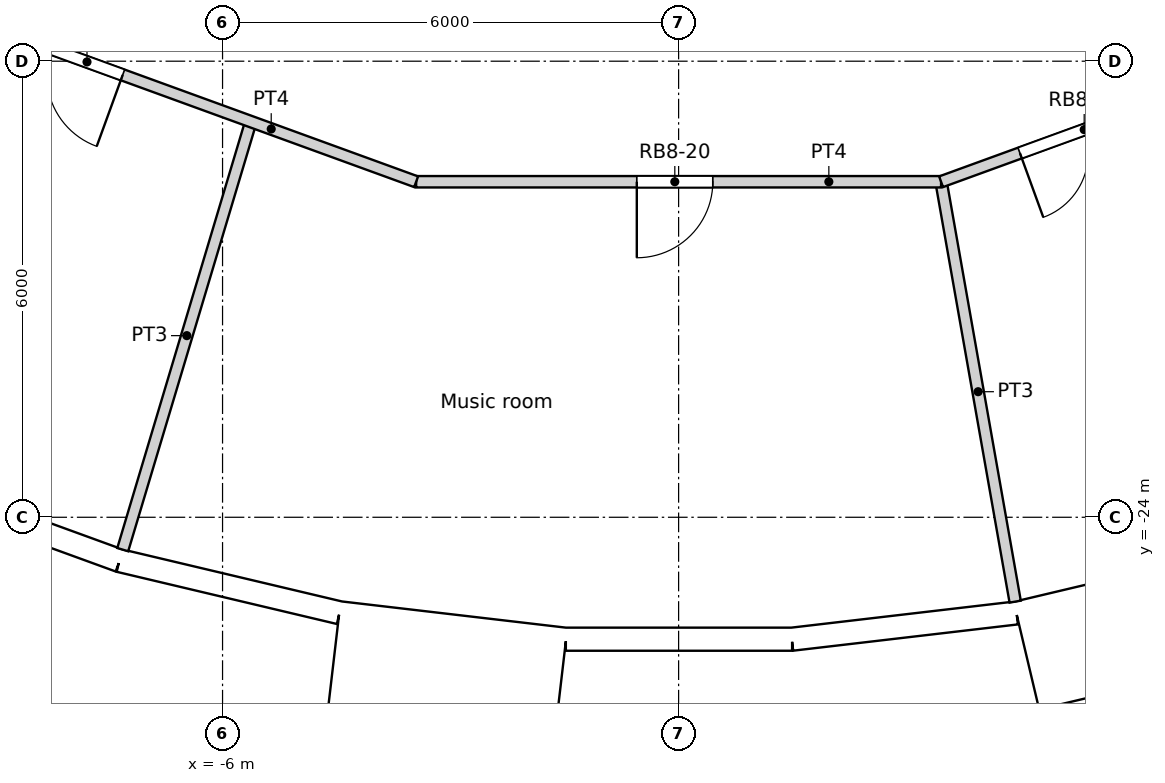
"""IFC4 building model, lengths in metres.
Left out: names, types, materials, properties, quantities, classifications, styles, units other than length and angle.
Written with IfcOpenShell. Run it as: python <this file> out.ifc"""

import sys

from ifc_helpers import new_model, si_unit, direction, frame, frame_2d, origin, origin_2d, place, context, subcontext, project, spatial, rectangle, circle, extrude, element, fill, save


model = new_model("IFC4")
c1 = context("Model", 3, precision=1e-05, world=origin(), true_north=direction((0.0, 1.0)))
c2 = subcontext(c1, "Body", "Model", "MODEL_VIEW")
j1 = project(units=[si_unit("LENGTHUNIT", "METRE"), si_unit("PLANEANGLEUNIT", "RADIAN")], contexts=[c1])
p1 = place(None, origin())
s1 = spatial("IfcSite", under=j1, at=p1, CompositionType="ELEMENT")
p2 = place(p1, origin())
s2 = spatial("IfcBuilding", under=s1, at=p2, CompositionType="ELEMENT")
p3 = place(p2, frame((0.0, 0.0, 201.6)))
s3 = spatial("IfcBuildingStorey", under=s2, at=p3, CompositionType="ELEMENT", Elevation=201.6)
for number, where, z_axis, x_axis in (
    (1, (-7.04, -23.516, 0.0), (0.0, 0.0, 1.0), (1.0, 0.0, 0.0)),
    (2, (-1.427, -24.506, 0.0), (0.0, 0.0, 1.0), (1.0, 0.0, 0.0)),
    (3, (4.263, -24.175, 0.0), (0.0, 0.0, 1.0), (1.0, 0.0, 0.0)),
):
    element("IfcColumn", number, at=place(p3, frame(where, z_axis=z_axis, x_axis=x_axis)), inside=s3, PredefinedType="COLUMN", context=c2, shape_type="SweptSolid", body=[
        extrude(circle(Radius=0.6, at=origin_2d()), origin(), (0.0, 0.0, 1.0), 3.6),
    ])
for number, where, z_axis, x_axis in (
    (4, (-4.188, -18.35, 0.0), (0.0, 0.0, 1.0), (1.0, 0.0, 0.0)),
    (5, (1.406, -18.77, 0.0), (0.0, 0.0, 1.0), (1.0, 0.0, 0.0)),
):
    element("IfcColumn", number, at=place(p3, frame(where, z_axis=z_axis, x_axis=x_axis)), inside=s3, PredefinedType="COLUMN", context=c2, shape_type="SweptSolid", body=[
        extrude(circle(Radius=0.65, at=origin_2d()), origin(), (0.0, 0.0, 1.0), 3.6),
    ])
p4 = place(p3, frame((-10.149, -23.553, 0.0), z_axis=(0.0, 0.0, 1.0), x_axis=(0.939690282133, -0.342026568652, 0.0)))
e6 = element("IfcWall", 6, at=p4, inside=s3, PredefinedType="SOLIDWALL", context=c2, shape_type="SweptSolid", body=[
    extrude(rectangle(XDim=2.973, YDim=0.3, at=frame_2d((1.486, 0.0))), origin(), (0.0, 0.0, 1.0), 3.3),
])
p5 = place(p4, frame((1.486, 0.0, 1.55)))
e7 = element("IfcOpeningElement", 7, at=p5, cuts=e6, PredefinedType="OPENING", context=c2, shape_type="SweptSolid", body=[
    extrude(circle(Radius=0.9, at=origin_2d()), frame((0.0, 0.16, 0.0), z_axis=(0.0, -1.0, 0.0), x_axis=(1.0, 0.0, 0.0)), (0.0, 0.0, 1.0), 0.32),
])
p6 = place(p3, frame((-7.356, -24.57, 0.0), z_axis=(0.0, 0.0, 1.0), x_axis=(0.973045378923, -0.230613725862, 0.0)))
e8 = element("IfcWall", 8, at=p6, inside=s3, PredefinedType="SOLIDWALL", context=c2, shape_type="SweptSolid", body=[
    extrude(rectangle(XDim=2.973, YDim=0.3, at=frame_2d((1.486, 0.0))), origin(), (0.0, 0.0, 1.0), 3.3),
])
p7 = place(p6, frame((1.486, 0.0, 1.55)))
e9 = element("IfcOpeningElement", 9, at=p7, cuts=e8, PredefinedType="OPENING", context=c2, shape_type="SweptSolid", body=[
    extrude(circle(Radius=0.9, at=origin_2d()), frame((0.0, 0.16, 0.0), z_axis=(0.0, -1.0, 0.0), x_axis=(1.0, 0.0, 0.0)), (0.0, 0.0, 1.0), 0.32),
])
p8 = place(p3, frame((-4.529, -25.828, -0.3), z_axis=(0.0, 0.0, 1.0), x_axis=(0.9932342274, -0.116128246006, 0.0)))
e10 = element("IfcWall", 10, at=p8, inside=s3, PredefinedType="ELEMENTEDWALL", context=c2, shape_type="SweptSolid", body=[
    extrude(rectangle(XDim=3.0, YDim=1.45, at=frame_2d((1.5, 0.0))), origin(), (0.0, 0.0, 1.0), 3.6),
])
p9 = place(p8, frame((1.5, 0.0, 1.85)))
e11 = element("IfcOpeningElement", 11, at=p9, cuts=e10, PredefinedType="OPENING", context=c2, shape_type="SweptSolid", body=[
    extrude(circle(Radius=0.9, at=origin_2d()), frame((0.0, 0.735, 0.0), z_axis=(0.0, -1.0, 0.0), x_axis=(1.0, 0.0, 0.0)), (0.0, 0.0, 1.0), 1.47),
])
p10 = place(p3, frame((-1.482, -25.604, 0.0), z_axis=(0.0, 0.0, 1.0), x_axis=(1.0, 0.0, 0.0)))
e12 = element("IfcWall", 12, at=p10, inside=s3, PredefinedType="SOLIDWALL", context=c2, shape_type="SweptSolid", body=[
    extrude(rectangle(XDim=2.973, YDim=0.3, at=frame_2d((1.486, 0.0))), origin(), (0.0, 0.0, 1.0), 3.3),
])
p11 = place(p10, frame((1.486, 0.0, 1.55)))
e13 = element("IfcOpeningElement", 13, at=p11, cuts=e12, PredefinedType="OPENING", context=c2, shape_type="SweptSolid", body=[
    extrude(circle(Radius=0.9, at=origin_2d()), frame((0.0, 0.16, 0.0), z_axis=(0.0, -1.0, 0.0), x_axis=(1.0, 0.0, 0.0)), (0.0, 0.0, 1.0), 0.32),
])
p12 = place(p3, frame((1.491, -25.604, 0.0), z_axis=(0.0, 0.0, 1.0), x_axis=(0.993245010522, 0.1160359818, 0.0)))
e14 = element("IfcWall", 14, at=p12, inside=s3, PredefinedType="SOLIDWALL", context=c2, shape_type="SweptSolid", body=[
    extrude(rectangle(XDim=2.973, YDim=0.3, at=frame_2d((1.486, 0.0))), origin(), (0.0, 0.0, 1.0), 3.3),
])
p13 = place(p12, frame((1.486, 0.0, 1.55)))
e15 = element("IfcOpeningElement", 15, at=p13, cuts=e14, PredefinedType="OPENING", context=c2, shape_type="SweptSolid", body=[
    extrude(circle(Radius=0.9, at=origin_2d()), frame((0.0, 0.16, 0.0), z_axis=(0.0, -1.0, 0.0), x_axis=(1.0, 0.0, 0.0)), (0.0, 0.0, 1.0), 0.32),
])
p14 = place(p3, frame((4.578, -25.819, -0.3), z_axis=(0.0, 0.0, 1.0), x_axis=(0.973042333261, 0.23062657627, 0.0)))
e16 = element("IfcWall", 16, at=p14, inside=s3, PredefinedType="ELEMENTEDWALL", context=c2, shape_type="SweptSolid", body=[
    extrude(rectangle(XDim=3.0, YDim=1.45, at=frame_2d((1.5, 0.0))), origin(), (0.0, 0.0, 1.0), 3.6),
])
p15 = place(p14, frame((1.5, 0.0, 1.85)))
e17 = element("IfcOpeningElement", 17, at=p15, cuts=e16, PredefinedType="OPENING", context=c2, shape_type="SweptSolid", body=[
    extrude(circle(Radius=0.9, at=origin_2d()), frame((0.0, 0.735, 0.0), z_axis=(0.0, -1.0, 0.0), x_axis=(1.0, 0.0, 0.0)), (0.0, 0.0, 1.0), 1.47),
])
p16 = place(p3, frame((-9.944, -17.223, 0.0), z_axis=(0.0, 0.0, 1.0), x_axis=(0.939672634566, -0.342075050021, 0.0)))
e18 = element("IfcWall", 18, at=p16, inside=s3, PredefinedType="PARTITIONING", context=c2, shape_type="SweptSolid", body=[
    extrude(rectangle(XDim=6.908, YDim=0.15, at=frame_2d((3.454, 0.0))), origin(), (0.0, 0.0, 1.0), 3.3),
])
p17 = place(p16, frame((1.799, 0.0, 0.0)))
e19 = element("IfcOpeningElement", 19, at=p17, cuts=e18, PredefinedType="OPENING", context=c2, shape_type="SweptSolid", body=[
    extrude(rectangle(XDim=1.0, YDim=2.04, at=frame_2d((0.5, 1.02))), frame((0.0, 0.075, 0.0), z_axis=(0.0, -1.0, 0.0), x_axis=(1.0, 0.0, 0.0)), (0.0, 0.0, 1.0), 0.15),
])
p18 = place(p3, frame((-3.453, -19.586, 0.0), z_axis=(0.0, 0.0, 1.0), x_axis=(1.0, 0.0, 0.0)))
e20 = element("IfcWall", 20, at=p18, inside=s3, PredefinedType="PARTITIONING", context=c2, shape_type="SweptSolid", body=[
    extrude(rectangle(XDim=6.906, YDim=0.15, at=frame_2d((3.453, 0.0))), origin(), (0.0, 0.0, 1.0), 3.3),
])
p19 = place(p18, frame((2.903, 0.0, 0.0)))
e21 = element("IfcOpeningElement", 21, at=p19, cuts=e20, PredefinedType="OPENING", context=c2, shape_type="SweptSolid", body=[
    extrude(rectangle(XDim=1.0, YDim=2.04, at=frame_2d((0.5, 1.02))), frame((0.0, 0.075, 0.0), z_axis=(0.0, -1.0, 0.0), x_axis=(1.0, 0.0, 0.0)), (0.0, 0.0, 1.0), 0.15),
])
p20 = place(p3, frame((3.453, -19.586, 0.0), z_axis=(0.0, 0.0, 1.0), x_axis=(0.939672634566, 0.342075050021, 0.0)))
e22 = element("IfcWall", 22, at=p20, inside=s3, PredefinedType="PARTITIONING", context=c2, shape_type="SweptSolid", body=[
    extrude(rectangle(XDim=6.908, YDim=0.15, at=frame_2d((3.454, 0.0))), origin(), (0.0, 0.0, 1.0), 3.3),
])
p21 = place(p20, frame((1.104, 0.0, 0.0)))
e23 = element("IfcOpeningElement", 23, at=p21, cuts=e22, PredefinedType="OPENING", context=c2, shape_type="SweptSolid", body=[
    extrude(rectangle(XDim=1.8, YDim=2.1, at=frame_2d((0.9, 1.05))), frame((0.0, 0.075, 0.0), z_axis=(0.0, -1.0, 0.0), x_axis=(1.0, 0.0, 0.0)), (0.0, 0.0, 1.0), 0.15),
])
p22 = place(p3, frame((-7.313, -24.426, 0.0), z_axis=(0.0, 0.0, 1.0), x_axis=(0.286833432865, 0.957980470464, 0.0)))
e24 = element("IfcWall", 24, at=p22, inside=s3, PredefinedType="PARTITIONING", context=c2, shape_type="SweptSolid", body=[
    extrude(rectangle(XDim=5.878, YDim=0.15, at=frame_2d((2.939, 0.0))), origin(), (0.0, 0.0, 1.0), 3.3),
])
p23 = place(p3, frame((3.453, -19.586, 0.0), z_axis=(0.0, 0.0, 1.0), x_axis=(0.17382754149, -0.984776109489, 0.0)))
e25 = element("IfcWall", 25, at=p23, inside=s3, PredefinedType="PARTITIONING", context=c2, shape_type="SweptSolid", body=[
    extrude(rectangle(XDim=5.61, YDim=0.15, at=frame_2d((2.805, 0.0))), origin(), (0.0, 0.0, 1.0), 3.3),
])
p24 = place(p5, origin())
e26 = element("IfcWindow", 26, at=p24, inside=s3, PartitioningType="SINGLE_PANEL", PredefinedType="WINDOW", context=c2, shape_type="SweptSolid", body=[
    extrude(circle(Radius=0.9, at=origin_2d()), frame((0.0, 0.12, 0.0), z_axis=(0.0, -1.0, 0.0), x_axis=(1.0, 0.0, 0.0)), (0.0, 0.0, 1.0), 0.1),
])
fill(e7, e26)
p25 = place(p7, origin())
e27 = element("IfcWindow", 27, at=p25, inside=s3, PartitioningType="SINGLE_PANEL", PredefinedType="WINDOW", context=c2, shape_type="SweptSolid", body=[
    extrude(circle(Radius=0.9, at=origin_2d()), frame((0.0, 0.12, 0.0), z_axis=(0.0, -1.0, 0.0), x_axis=(1.0, 0.0, 0.0)), (0.0, 0.0, 1.0), 0.1),
])
fill(e9, e27)
p26 = place(p9, origin())
e28 = element("IfcWindow", 28, at=p26, inside=s3, PartitioningType="SINGLE_PANEL", PredefinedType="WINDOW", context=c2, shape_type="SweptSolid", body=[
    extrude(circle(Radius=0.9, at=origin_2d()), frame((0.0, 0.695, 0.0), z_axis=(0.0, -1.0, 0.0), x_axis=(1.0, 0.0, 0.0)), (0.0, 0.0, 1.0), 0.1),
])
fill(e11, e28)
p27 = place(p11, origin())
e29 = element("IfcWindow", 29, at=p27, inside=s3, PartitioningType="SINGLE_PANEL", PredefinedType="WINDOW", context=c2, shape_type="SweptSolid", body=[
    extrude(circle(Radius=0.9, at=origin_2d()), frame((0.0, 0.12, 0.0), z_axis=(0.0, -1.0, 0.0), x_axis=(1.0, 0.0, 0.0)), (0.0, 0.0, 1.0), 0.1),
])
fill(e13, e29)
p28 = place(p13, origin())
e30 = element("IfcWindow", 30, at=p28, inside=s3, PartitioningType="SINGLE_PANEL", PredefinedType="WINDOW", context=c2, shape_type="SweptSolid", body=[
    extrude(circle(Radius=0.9, at=origin_2d()), frame((0.0, 0.12, 0.0), z_axis=(0.0, -1.0, 0.0), x_axis=(1.0, 0.0, 0.0)), (0.0, 0.0, 1.0), 0.1),
])
fill(e15, e30)
p29 = place(p15, origin())
e31 = element("IfcWindow", 31, at=p29, inside=s3, PartitioningType="SINGLE_PANEL", PredefinedType="WINDOW", context=c2, shape_type="SweptSolid", body=[
    extrude(circle(Radius=0.9, at=origin_2d()), frame((0.0, 0.695, 0.0), z_axis=(0.0, -1.0, 0.0), x_axis=(1.0, 0.0, 0.0)), (0.0, 0.0, 1.0), 0.1),
])
fill(e17, e31)
p30 = place(p17, origin())
e32 = element("IfcDoor", 32, at=p30, inside=s3, OperationType="SINGLE_SWING_LEFT", PredefinedType="DOOR", context=c2, shape_type="SweptSolid", body=[
    extrude(rectangle(XDim=1.0, YDim=2.04, at=frame_2d((0.5, 1.02))), frame((0.0, 0.025, 0.0), z_axis=(0.0, -1.0, 0.0), x_axis=(1.0, 0.0, 0.0)), (0.0, 0.0, 1.0), 0.05),
])
fill(e19, e32)
p31 = place(p19, origin())
e33 = element("IfcDoor", 33, at=p31, inside=s3, OperationType="SINGLE_SWING_RIGHT", PredefinedType="DOOR", context=c2, shape_type="SweptSolid", body=[
    extrude(rectangle(XDim=1.0, YDim=2.04, at=frame_2d((0.5, 1.02))), frame((0.0, 0.025, 0.0), z_axis=(0.0, -1.0, 0.0), x_axis=(1.0, 0.0, 0.0)), (0.0, 0.0, 1.0), 0.05),
])
fill(e21, e33)
p32 = place(p21, origin())
e34 = element("IfcDoor", 34, at=p32, inside=s3, OperationType="DOUBLE_DOOR_SINGLE_SWING", PredefinedType="DOOR", context=c2, shape_type="SweptSolid", body=[
    extrude(rectangle(XDim=1.8, YDim=2.1, at=frame_2d((0.9, 1.05))), frame((0.0, 0.025, 0.0), z_axis=(0.0, -1.0, 0.0), x_axis=(1.0, 0.0, 0.0)), (0.0, 0.0, 1.0), 0.05),
])
fill(e23, e34)
save(model, sys.argv[1])
